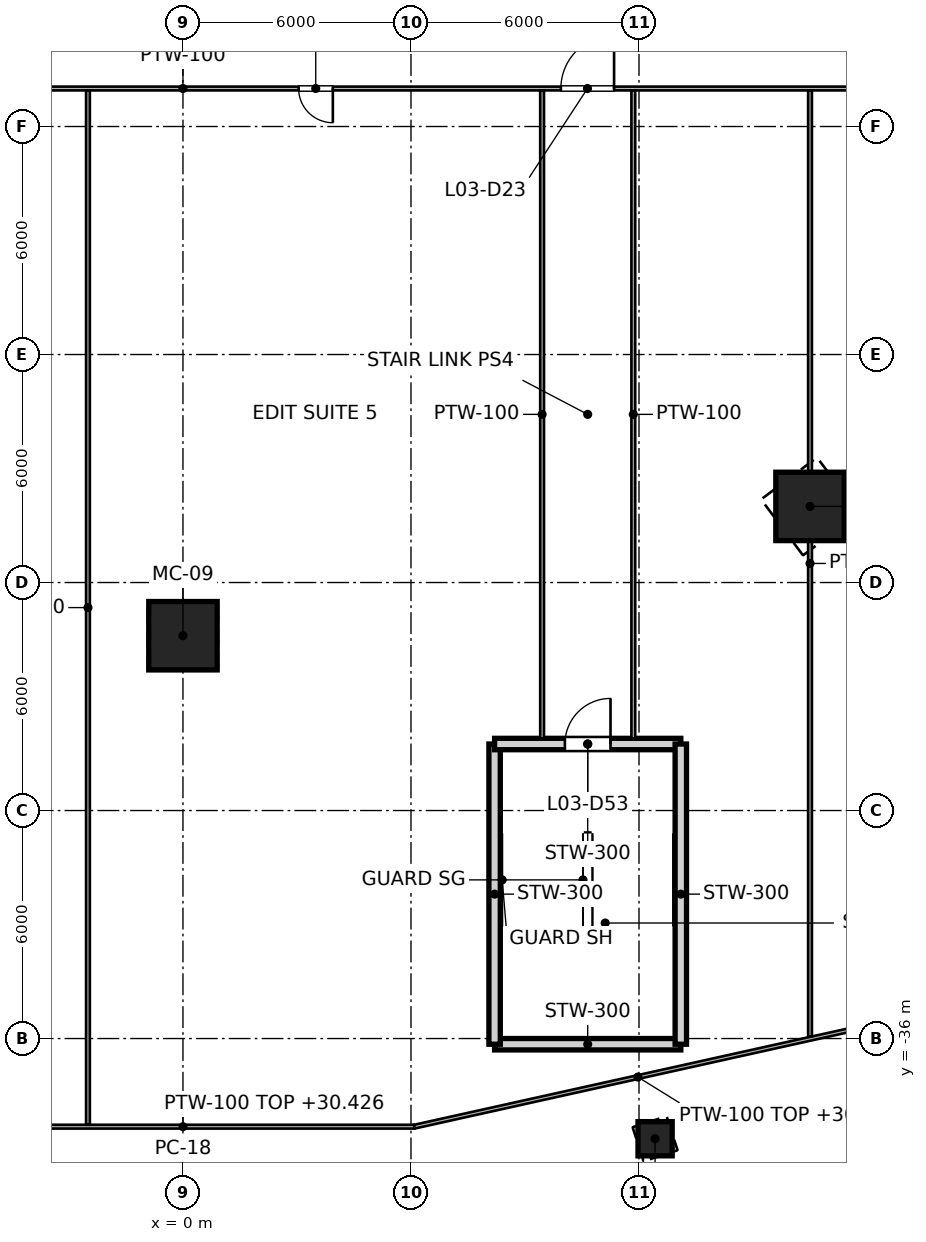
"""IFC4 building model, lengths in metres.
Left out: names, types, materials, properties, quantities, classifications, styles, units other than length and angle.
Written with IfcOpenShell. Run it as: python <this file> out.ifc"""

import sys

from ifc_helpers import new_model, si_unit, direction, frame, frame_2d, origin, origin_2d, place, context, subcontext, project, spatial, rectangle, hollow_rectangle, extrude, element, fill, save


model = new_model("IFC4")
c1 = context("Model", 3, precision=1e-05, world=origin(), true_north=direction((0.0, 1.0)))
c2 = subcontext(c1, "Body", "Model", "MODEL_VIEW")
j1 = project(units=[si_unit("LENGTHUNIT", "METRE"), si_unit("PLANEANGLEUNIT", "RADIAN")], contexts=[c1])
p1 = place(None, origin())
s1 = spatial("IfcSite", under=j1, at=p1, CompositionType="ELEMENT")
p2 = place(p1, origin())
s2 = spatial("IfcBuilding", under=s1, at=p2, CompositionType="ELEMENT")
p3 = place(p2, frame((0.0, 0.0, 26.0)))
s3 = spatial("IfcBuildingStorey", under=s2, at=p3, CompositionType="ELEMENT", Elevation=26.0)
for number, where, z_axis, x_axis in (
    (1, (0.0, -25.4, 0.0), (0.0, 0.0, 1.0), (0.0, -1.0, 0.0)),
    (2, (16.5, -21.997, 0.0), (0.0, 0.0, 1.0), (0.6, -0.8, 0.0)),
):
    element("IfcColumn", number, at=place(p3, frame(where, z_axis=z_axis, x_axis=x_axis)), inside=s3, PredefinedType="COLUMN", context=c2, shape_type="SweptSolid", body=[
        extrude(hollow_rectangle(XDim=1.8, YDim=1.8, WallThickness=0.08, at=origin_2d()), origin(), (0.0, 0.0, 1.0), 5.4),
    ])
p4 = place(p3, frame((12.423, -38.637, 0.0), z_axis=(0.0, 0.0, 1.0), x_axis=(0.306104074477, -0.951998054404, 0.0)))
e3 = element("IfcColumn", 3, at=p4, inside=s3, PredefinedType="COLUMN", context=c2, shape_type="SweptSolid", body=[
    extrude(hollow_rectangle(XDim=0.9, YDim=0.9, WallThickness=0.04, at=origin_2d()), origin(), (0.0, 0.0, 1.0), 5.4),
])
p5 = place(p3, frame((13.1, -36.15, 0.0), z_axis=(0.0, 0.0, 1.0), x_axis=(-1.0, 0.0, 0.0)))
e4 = element("IfcWall", 4, at=p5, inside=s3, PredefinedType="SOLIDWALL", context=c2, shape_type="SweptSolid", body=[
    extrude(rectangle(XDim=4.9, YDim=0.3, at=frame_2d((2.45, 0.0))), origin(), (0.0, 0.0, 1.0), 5.2),
])
p6 = place(p3, frame((8.2, -36.15, 0.0), z_axis=(0.0, 0.0, 1.0), x_axis=(0.0, 1.0, 0.0)))
e5 = element("IfcWall", 5, at=p6, inside=s3, PredefinedType="SOLIDWALL", context=c2, shape_type="SweptSolid", body=[
    extrude(rectangle(XDim=7.9, YDim=0.3, at=frame_2d((3.95, 0.0))), origin(), (0.0, 0.0, 1.0), 5.2),
])
p7 = place(p3, frame((8.2, -28.25, 0.0), z_axis=(0.0, 0.0, 1.0), x_axis=(1.0, 0.0, 0.0)))
e6 = element("IfcWall", 6, at=p7, inside=s3, PredefinedType="SOLIDWALL", context=c2, shape_type="SweptSolid", body=[
    extrude(rectangle(XDim=4.9, YDim=0.3, at=frame_2d((2.45, 0.0))), origin(), (0.0, 0.0, 1.0), 5.2),
])
p8 = place(p7, frame((1.85, 0.0, 0.0)))
e7 = element("IfcOpeningElement", 7, at=p8, cuts=e6, PredefinedType="OPENING", context=c2, shape_type="SweptSolid", body=[
    extrude(rectangle(XDim=1.2, YDim=2.1, at=frame_2d((0.6, 1.05))), frame((0.0, 0.15, 0.0), z_axis=(0.0, -1.0, 0.0), x_axis=(1.0, 0.0, 0.0)), (0.0, 0.0, 1.0), 0.3),
])
p9 = place(p3, frame((13.1, -28.25, 0.0), z_axis=(0.0, 0.0, 1.0), x_axis=(0.0, -1.0, 0.0)))
e8 = element("IfcWall", 8, at=p9, inside=s3, PredefinedType="SOLIDWALL", context=c2, shape_type="SweptSolid", body=[
    extrude(rectangle(XDim=7.9, YDim=0.3, at=frame_2d((3.95, 0.0))), origin(), (0.0, 0.0, 1.0), 5.2),
])
p10 = place(p3, frame((-6.089, -38.319, 0.0), z_axis=(0.0, 0.0, 1.0), x_axis=(1.0, 0.0, 0.0)))
e9 = element("IfcWall", 9, at=p10, inside=s3, PredefinedType="PARTITIONING", context=c2, shape_type="SweptSolid", body=[
    extrude(rectangle(XDim=12.178, YDim=0.1, at=frame_2d((6.089, 0.0))), origin(), (0.0, 0.0, 1.0), 4.426),
])
p11 = place(p3, frame((6.089, -38.319, 0.0), z_axis=(0.0, 0.0, 1.0), x_axis=(0.97623471049, 0.216715920124, 0.0)))
e10 = element("IfcWall", 10, at=p11, inside=s3, PredefinedType="PARTITIONING", context=c2, shape_type="SweptSolid", body=[
    extrude(rectangle(XDim=12.05, YDim=0.1, at=frame_2d((6.025, 0.0))), origin(), (0.0, 0.0, 1.0), 4.426),
])
p12 = place(p3, frame((-44.256, -11.0, 0.0), z_axis=(0.0, 0.0, 1.0), x_axis=(1.0, 0.0, 0.0)))
e11 = element("IfcWall", 11, at=p12, inside=s3, PredefinedType="PARTITIONING", context=c2, shape_type="SweptSolid", body=[
    extrude(rectangle(XDim=88.512, YDim=0.1, at=frame_2d((44.256, 0.0))), origin(), (0.0, 0.0, 1.0), 4.268),
])
p13 = place(p12, frame((32.9, 0.0, 0.0)))
e12 = element("IfcOpeningElement", 12, at=p13, cuts=e11, PredefinedType="OPENING", context=c2, shape_type="SweptSolid", body=[
    extrude(rectangle(XDim=1.4, YDim=2.1, at=frame_2d((0.7, 1.05))), frame((0.0, 0.05, 0.0), z_axis=(0.0, -1.0, 0.0), x_axis=(1.0, 0.0, 0.0)), (0.0, 0.0, 1.0), 0.1),
])
p14 = place(p12, frame((54.2, 0.0, 0.0)))
e13 = element("IfcOpeningElement", 13, at=p14, cuts=e11, PredefinedType="OPENING", context=c2, shape_type="SweptSolid", body=[
    extrude(rectangle(XDim=1.4, YDim=2.1, at=frame_2d((0.7, 1.05))), frame((0.0, 0.05, 0.0), z_axis=(0.0, -1.0, 0.0), x_axis=(1.0, 0.0, 0.0)), (0.0, 0.0, 1.0), 0.1),
])
p15 = place(p12, frame((37.85, 0.0, 0.0)))
e14 = element("IfcOpeningElement", 14, at=p15, cuts=e11, PredefinedType="OPENING", context=c2, shape_type="SweptSolid", body=[
    extrude(rectangle(XDim=0.9, YDim=2.1, at=frame_2d((0.45, 1.05))), frame((0.0, 0.05, 0.0), z_axis=(0.0, -1.0, 0.0), x_axis=(1.0, 0.0, 0.0)), (0.0, 0.0, 1.0), 0.1),
])
p16 = place(p12, frame((47.3, 0.0, 0.0)))
e15 = element("IfcOpeningElement", 15, at=p16, cuts=e11, PredefinedType="OPENING", context=c2, shape_type="SweptSolid", body=[
    extrude(rectangle(XDim=0.9, YDim=2.1, at=frame_2d((0.45, 1.05))), frame((0.0, 0.05, 0.0), z_axis=(0.0, -1.0, 0.0), x_axis=(1.0, 0.0, 0.0)), (0.0, 0.0, 1.0), 0.1),
])
p17 = place(p3, frame((-2.5, -11.05, 0.0), z_axis=(0.0, 0.0, 1.0), x_axis=(0.0, -1.0, 0.0)))
e16 = element("IfcWall", 16, at=p17, inside=s3, PredefinedType="PARTITIONING", context=c2, shape_type="SweptSolid", body=[
    extrude(rectangle(XDim=27.219, YDim=0.1, at=frame_2d((13.61, 0.0))), origin(), (0.0, 0.0, 1.0), 4.268),
])
p18 = place(p3, frame((16.5, -11.05, 0.0), z_axis=(0.0, 0.0, 1.0), x_axis=(0.0, -1.0, 0.0)))
e17 = element("IfcWall", 17, at=p18, inside=s3, PredefinedType="PARTITIONING", context=c2, shape_type="SweptSolid", body=[
    extrude(rectangle(XDim=24.896, YDim=0.1, at=frame_2d((12.448, 0.0))), origin(), (0.0, 0.0, 1.0), 4.345),
])
for number, where, z_axis, x_axis in (
    (18, (9.45, -11.05, 0.0), (0.0, 0.0, 1.0), (0.0, -1.0, 0.0)),
    (19, (11.85, -11.05, 0.0), (0.0, 0.0, 1.0), (0.0, -1.0, 0.0)),
):
    element("IfcWall", number, at=place(p3, frame(where, z_axis=z_axis, x_axis=x_axis)), inside=s3, PredefinedType="PARTITIONING", context=c2, shape_type="SweptSolid", body=[
        extrude(rectangle(XDim=17.05, YDim=0.1, at=frame_2d((8.525, 0.0))), origin(), (0.0, 0.0, 1.0), 4.268),
    ])
p19 = place(p14, origin())
e20 = element("IfcDoor", 20, at=p19, inside=s3, OperationType="SINGLE_SWING_RIGHT", PredefinedType="DOOR", context=c2, shape_type="SweptSolid", body=[
    extrude(rectangle(XDim=1.4, YDim=2.1, at=frame_2d((0.7, 1.05))), frame((0.0, 0.025, 0.0), z_axis=(0.0, -1.0, 0.0), x_axis=(1.0, 0.0, 0.0)), (0.0, 0.0, 1.0), 0.05),
])
fill(e13, e20)
p20 = place(p16, origin())
e21 = element("IfcDoor", 21, at=p20, inside=s3, OperationType="SINGLE_SWING_RIGHT", PredefinedType="DOOR", context=c2, shape_type="SweptSolid", body=[
    extrude(rectangle(XDim=0.9, YDim=2.1, at=frame_2d((0.45, 1.05))), frame((0.0, 0.025, 0.0), z_axis=(0.0, -1.0, 0.0), x_axis=(1.0, 0.0, 0.0)), (0.0, 0.0, 1.0), 0.05),
])
fill(e15, e21)
p21 = place(p8, origin())
e22 = element("IfcDoor", 22, at=p21, inside=s3, OperationType="SINGLE_SWING_RIGHT", PredefinedType="DOOR", context=c2, shape_type="SweptSolid", body=[
    extrude(rectangle(XDim=1.2, YDim=2.1, at=frame_2d((0.6, 1.05))), frame((0.0, 0.025, 0.0), z_axis=(0.0, -1.0, 0.0), x_axis=(1.0, 0.0, 0.0)), (0.0, 0.0, 1.0), 0.05),
])
fill(e7, e22)
save(model, sys.argv[1])
